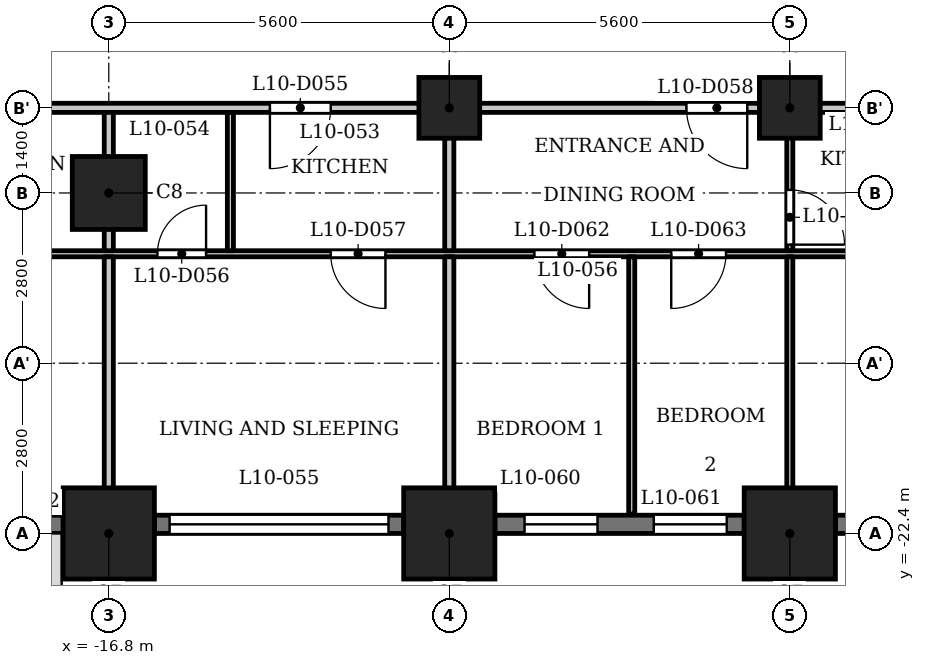
"""IFC4 building model, lengths in metres.
Left out: names, types, materials, properties, quantities, classifications, styles, units other than length and angle.
Written with IfcOpenShell. Run it as: python <this file> out.ifc"""

import sys

from ifc_helpers import new_model, si_unit, direction, frame, frame_2d, origin, origin_2d, place, context, subcontext, project, spatial, rectangle, extrude, element, fill, save


model = new_model("IFC4")
c1 = context("Model", 3, precision=1e-05, world=origin(), true_north=direction((0.0, 1.0)))
c2 = subcontext(c1, "Body", "Model", "MODEL_VIEW")
j1 = project(units=[si_unit("LENGTHUNIT", "METRE"), si_unit("PLANEANGLEUNIT", "RADIAN")], contexts=[c1])
p1 = place(None, origin())
s1 = spatial("IfcSite", under=j1, at=p1, CompositionType="ELEMENT")
p2 = place(p1, origin())
s2 = spatial("IfcBuilding", under=s1, at=p2, CompositionType="ELEMENT")
p3 = place(p2, frame((0.0, 0.0, 44.5)))
s3 = spatial("IfcBuildingStorey", under=s2, at=p3, CompositionType="ELEMENT", Elevation=44.5)
for number, where, z_axis, x_axis in (
    (1, (-16.8, -22.4, 0.0), (0.0, 0.0, 1.0), (1.0, 0.0, 0.0)),
    (2, (-11.2, -22.4, 0.0), (0.0, 0.0, 1.0), (1.0, 0.0, 0.0)),
    (3, (-5.6, -22.4, 0.0), (0.0, 0.0, 1.0), (1.0, 0.0, 0.0)),
):
    element("IfcColumn", number, at=place(p3, frame(where, z_axis=z_axis, x_axis=x_axis)), inside=s3, PredefinedType="COLUMN", context=c2, shape_type="SweptSolid", body=[
        extrude(rectangle(XDim=1.5, YDim=1.5, at=origin_2d()), origin(), (0.0, 0.0, 1.0), 3.5),
    ])
p4 = place(p3, frame((-16.8, -16.8, 0.0), z_axis=(0.0, 0.0, 1.0), x_axis=(1.0, 0.0, 0.0)))
e4 = element("IfcColumn", 4, at=p4, inside=s3, PredefinedType="COLUMN", context=c2, shape_type="SweptSolid", body=[
    extrude(rectangle(XDim=1.2, YDim=1.2, at=origin_2d()), origin(), (0.0, 0.0, 1.0), 3.5),
])
for number, where, z_axis, x_axis in (
    (5, (-11.2, -15.4, 0.0), (0.0, 0.0, 1.0), (1.0, 0.0, 0.0)),
    (6, (-5.6, -15.4, 0.0), (0.0, 0.0, 1.0), (1.0, 0.0, 0.0)),
):
    element("IfcColumn", number, at=place(p3, frame(where, z_axis=z_axis, x_axis=x_axis)), inside=s3, PredefinedType="COLUMN", context=c2, shape_type="SweptSolid", body=[
        extrude(rectangle(XDim=1.0, YDim=1.0, at=origin_2d()), origin(), (0.0, 0.0, 1.0), 3.5),
    ])
p5 = place(p3, frame((-20.0, -22.25, 0.0), z_axis=(0.0, 0.0, 1.0), x_axis=(1.0, 0.0, 0.0)))
e7 = element("IfcWall", 7, at=p5, inside=s3, PredefinedType="SOLIDWALL", context=c2, shape_type="SweptSolid", body=[
    extrude(rectangle(XDim=2.45, YDim=0.3, at=frame_2d((1.225, 0.0))), origin(), (0.0, 0.0, 1.0), 2.35),
])
p6 = place(p5, frame((0.325, 0.0, 0.9)))
e8 = element("IfcOpeningElement", 8, at=p6, cuts=e7, PredefinedType="OPENING", context=c2, shape_type="SweptSolid", body=[
    extrude(rectangle(XDim=1.8, YDim=1.25, at=frame_2d((0.9, 0.625))), frame((0.0, 0.16, 0.0), z_axis=(0.0, -1.0, 0.0), x_axis=(1.0, 0.0, 0.0)), (0.0, 0.0, 1.0), 0.32),
])
p7 = place(p3, frame((-16.05, -22.25, 0.0), z_axis=(0.0, 0.0, 1.0), x_axis=(1.0, 0.0, 0.0)))
e9 = element("IfcWall", 9, at=p7, inside=s3, PredefinedType="SOLIDWALL", context=c2, shape_type="SweptSolid", body=[
    extrude(rectangle(XDim=4.1, YDim=0.3, at=frame_2d((2.05, 0.0))), origin(), (0.0, 0.0, 1.0), 2.35),
])
p8 = place(p7, frame((0.25, 0.0, 1.2)))
e10 = element("IfcOpeningElement", 10, at=p8, cuts=e9, PredefinedType="OPENING", context=c2, shape_type="SweptSolid", body=[
    extrude(rectangle(XDim=3.6, YDim=0.95, at=frame_2d((1.8, 0.475))), frame((0.0, 0.16, 0.0), z_axis=(0.0, -1.0, 0.0), x_axis=(1.0, 0.0, 0.0)), (0.0, 0.0, 1.0), 0.32),
])
p9 = place(p3, frame((-10.45, -22.25, 0.0), z_axis=(0.0, 0.0, 1.0), x_axis=(1.0, 0.0, 0.0)))
e11 = element("IfcWall", 11, at=p9, inside=s3, PredefinedType="SOLIDWALL", context=c2, shape_type="SweptSolid", body=[
    extrude(rectangle(XDim=4.1, YDim=0.3, at=frame_2d((2.05, 0.0))), origin(), (0.0, 0.0, 1.0), 2.35),
])
p10 = place(p9, frame((0.488, 0.0, 0.6)))
e12 = element("IfcOpeningElement", 12, at=p10, cuts=e11, PredefinedType="OPENING", context=c2, shape_type="SweptSolid", body=[
    extrude(rectangle(XDim=1.2, YDim=1.55, at=frame_2d((0.6, 0.775))), frame((0.0, 0.16, 0.0), z_axis=(0.0, -1.0, 0.0), x_axis=(1.0, 0.0, 0.0)), (0.0, 0.0, 1.0), 0.32),
])
p11 = place(p9, frame((2.613, 0.0, 0.6)))
e13 = element("IfcOpeningElement", 13, at=p11, cuts=e11, PredefinedType="OPENING", context=c2, shape_type="SweptSolid", body=[
    extrude(rectangle(XDim=1.2, YDim=1.55, at=frame_2d((0.6, 0.775))), frame((0.0, 0.16, 0.0), z_axis=(0.0, -1.0, 0.0), x_axis=(1.0, 0.0, 0.0)), (0.0, 0.0, 1.0), 0.32),
])
p12 = place(p3, frame((-4.85, -22.25, 0.0), z_axis=(0.0, 0.0, 1.0), x_axis=(1.0, 0.0, 0.0)))
e14 = element("IfcWall", 14, at=p12, inside=s3, PredefinedType="SOLIDWALL", context=c2, shape_type="SweptSolid", body=[
    extrude(rectangle(XDim=4.1, YDim=0.3, at=frame_2d((2.05, 0.0))), origin(), (0.0, 0.0, 1.0), 2.35),
])
p13 = place(p12, frame((0.25, 0.0, 1.2)))
e15 = element("IfcOpeningElement", 15, at=p13, cuts=e14, PredefinedType="OPENING", context=c2, shape_type="SweptSolid", body=[
    extrude(rectangle(XDim=3.6, YDim=0.95, at=frame_2d((1.8, 0.475))), frame((0.0, 0.16, 0.0), z_axis=(0.0, -1.0, 0.0), x_axis=(1.0, 0.0, 0.0)), (0.0, 0.0, 1.0), 0.32),
])
p14 = place(p3, frame((-26.394, -17.8, 0.0), z_axis=(0.0, 0.0, 1.0), x_axis=(1.0, 0.0, 0.0)))
e16 = element("IfcWall", 16, at=p14, inside=s3, PredefinedType="PARTITIONING", context=c2, shape_type="SweptSolid", body=[
    extrude(rectangle(XDim=53.126, YDim=0.1, at=frame_2d((26.563, 0.0))), origin(), (0.0, 0.0, 1.0), 3.2),
])
p15 = place(p14, frame((0.794, 0.0, 0.0)))
e17 = element("IfcOpeningElement", 17, at=p15, cuts=e16, PredefinedType="OPENING", context=c2, shape_type="SweptSolid", body=[
    extrude(rectangle(XDim=0.8, YDim=2.1, at=frame_2d((0.4, 1.05))), frame((0.0, 0.06, 0.0), z_axis=(0.0, -1.0, 0.0), x_axis=(1.0, 0.0, 0.0)), (0.0, 0.0, 1.0), 0.12),
])
p16 = place(p14, frame((5.644, 0.0, 0.0)))
e18 = element("IfcOpeningElement", 18, at=p16, cuts=e16, PredefinedType="OPENING", context=c2, shape_type="SweptSolid", body=[
    extrude(rectangle(XDim=0.9, YDim=2.1, at=frame_2d((0.45, 1.05))), frame((0.0, 0.06, 0.0), z_axis=(0.0, -1.0, 0.0), x_axis=(1.0, 0.0, 0.0)), (0.0, 0.0, 1.0), 0.12),
])
p17 = place(p14, frame((10.394, 0.0, 0.0)))
e19 = element("IfcOpeningElement", 19, at=p17, cuts=e16, PredefinedType="OPENING", context=c2, shape_type="SweptSolid", body=[
    extrude(rectangle(XDim=0.8, YDim=2.1, at=frame_2d((0.4, 1.05))), frame((0.0, 0.06, 0.0), z_axis=(0.0, -1.0, 0.0), x_axis=(1.0, 0.0, 0.0)), (0.0, 0.0, 1.0), 0.12),
])
p18 = place(p14, frame((13.244, 0.0, 0.0)))
e20 = element("IfcOpeningElement", 20, at=p18, cuts=e16, PredefinedType="OPENING", context=c2, shape_type="SweptSolid", body=[
    extrude(rectangle(XDim=0.9, YDim=2.1, at=frame_2d((0.45, 1.05))), frame((0.0, 0.06, 0.0), z_axis=(0.0, -1.0, 0.0), x_axis=(1.0, 0.0, 0.0)), (0.0, 0.0, 1.0), 0.12),
])
p19 = place(p14, frame((23.944, 0.0, 0.0)))
e21 = element("IfcOpeningElement", 21, at=p19, cuts=e16, PredefinedType="OPENING", context=c2, shape_type="SweptSolid", body=[
    extrude(rectangle(XDim=0.8, YDim=2.1, at=frame_2d((0.4, 1.05))), frame((0.0, 0.06, 0.0), z_axis=(0.0, -1.0, 0.0), x_axis=(1.0, 0.0, 0.0)), (0.0, 0.0, 1.0), 0.12),
])
p20 = place(p14, frame((22.194, 0.0, 0.0)))
e22 = element("IfcOpeningElement", 22, at=p20, cuts=e16, PredefinedType="OPENING", context=c2, shape_type="SweptSolid", body=[
    extrude(rectangle(XDim=0.9, YDim=2.1, at=frame_2d((0.45, 1.05))), frame((0.0, 0.06, 0.0), z_axis=(0.0, -1.0, 0.0), x_axis=(1.0, 0.0, 0.0)), (0.0, 0.0, 1.0), 0.12),
])
p21 = place(p14, frame((16.594, 0.0, 0.0)))
e23 = element("IfcOpeningElement", 23, at=p21, cuts=e16, PredefinedType="OPENING", context=c2, shape_type="SweptSolid", body=[
    extrude(rectangle(XDim=0.9, YDim=2.1, at=frame_2d((0.45, 1.05))), frame((0.0, 0.06, 0.0), z_axis=(0.0, -1.0, 0.0), x_axis=(1.0, 0.0, 0.0)), (0.0, 0.0, 1.0), 0.12),
])
p22 = place(p14, frame((18.844, 0.0, 0.0)))
e24 = element("IfcOpeningElement", 24, at=p22, cuts=e16, PredefinedType="OPENING", context=c2, shape_type="SweptSolid", body=[
    extrude(rectangle(XDim=0.9, YDim=2.1, at=frame_2d((0.45, 1.05))), frame((0.0, 0.06, 0.0), z_axis=(0.0, -1.0, 0.0), x_axis=(1.0, 0.0, 0.0)), (0.0, 0.0, 1.0), 0.12),
])
p23 = place(p14, frame((30.544, 0.0, 0.0)))
e25 = element("IfcOpeningElement", 25, at=p23, cuts=e16, PredefinedType="OPENING", context=c2, shape_type="SweptSolid", body=[
    extrude(rectangle(XDim=0.8, YDim=2.1, at=frame_2d((0.4, 1.05))), frame((0.0, 0.06, 0.0), z_axis=(0.0, -1.0, 0.0), x_axis=(1.0, 0.0, 0.0)), (0.0, 0.0, 1.0), 0.12),
])
p24 = place(p14, frame((27.294, 0.0, 0.0)))
e26 = element("IfcOpeningElement", 26, at=p24, cuts=e16, PredefinedType="OPENING", context=c2, shape_type="SweptSolid", body=[
    extrude(rectangle(XDim=0.9, YDim=2.1, at=frame_2d((0.45, 1.05))), frame((0.0, 0.06, 0.0), z_axis=(0.0, -1.0, 0.0), x_axis=(1.0, 0.0, 0.0)), (0.0, 0.0, 1.0), 0.12),
])
p25 = place(p14, frame((35.894, 0.0, 0.0)))
e27 = element("IfcOpeningElement", 27, at=p25, cuts=e16, PredefinedType="OPENING", context=c2, shape_type="SweptSolid", body=[
    extrude(rectangle(XDim=0.8, YDim=2.1, at=frame_2d((0.4, 1.05))), frame((0.0, 0.06, 0.0), z_axis=(0.0, -1.0, 0.0), x_axis=(1.0, 0.0, 0.0)), (0.0, 0.0, 1.0), 0.12),
])
p26 = place(p14, frame((33.644, 0.0, 0.0)))
e28 = element("IfcOpeningElement", 28, at=p26, cuts=e16, PredefinedType="OPENING", context=c2, shape_type="SweptSolid", body=[
    extrude(rectangle(XDim=0.9, YDim=2.1, at=frame_2d((0.45, 1.05))), frame((0.0, 0.06, 0.0), z_axis=(0.0, -1.0, 0.0), x_axis=(1.0, 0.0, 0.0)), (0.0, 0.0, 1.0), 0.12),
])
p27 = place(p14, frame((41.494, 0.0, 0.0)))
e29 = element("IfcOpeningElement", 29, at=p27, cuts=e16, PredefinedType="OPENING", context=c2, shape_type="SweptSolid", body=[
    extrude(rectangle(XDim=0.8, YDim=2.1, at=frame_2d((0.4, 1.05))), frame((0.0, 0.06, 0.0), z_axis=(0.0, -1.0, 0.0), x_axis=(1.0, 0.0, 0.0)), (0.0, 0.0, 1.0), 0.12),
])
p28 = place(p14, frame((38.744, 0.0, 0.0)))
e30 = element("IfcOpeningElement", 30, at=p28, cuts=e16, PredefinedType="OPENING", context=c2, shape_type="SweptSolid", body=[
    extrude(rectangle(XDim=0.9, YDim=2.1, at=frame_2d((0.45, 1.05))), frame((0.0, 0.06, 0.0), z_axis=(0.0, -1.0, 0.0), x_axis=(1.0, 0.0, 0.0)), (0.0, 0.0, 1.0), 0.12),
])
p29 = place(p14, frame((49.362, 0.0, 0.0)))
e31 = element("IfcOpeningElement", 31, at=p29, cuts=e16, PredefinedType="OPENING", context=c2, shape_type="SweptSolid", body=[
    extrude(rectangle(XDim=0.8, YDim=2.1, at=frame_2d((0.4, 1.05))), frame((0.0, 0.06, 0.0), z_axis=(0.0, -1.0, 0.0), x_axis=(1.0, 0.0, 0.0)), (0.0, 0.0, 1.0), 0.12),
])
p30 = place(p14, frame((45.094, 0.0, 0.0)))
e32 = element("IfcOpeningElement", 32, at=p30, cuts=e16, PredefinedType="OPENING", context=c2, shape_type="SweptSolid", body=[
    extrude(rectangle(XDim=0.9, YDim=2.1, at=frame_2d((0.45, 1.05))), frame((0.0, 0.06, 0.0), z_axis=(0.0, -1.0, 0.0), x_axis=(1.0, 0.0, 0.0)), (0.0, 0.0, 1.0), 0.12),
])
p31 = place(p3, frame((-27.484, -15.4, 0.0), z_axis=(0.0, 0.0, 1.0), x_axis=(1.0, 0.0, 0.0)))
e33 = element("IfcWall", 33, at=p31, inside=s3, PredefinedType="PARTITIONING", context=c2, shape_type="SweptSolid", body=[
    extrude(rectangle(XDim=54.968, YDim=0.15, at=frame_2d((27.484, 0.0))), origin(), (0.0, 0.0, 1.0), 3.2),
])
p32 = place(p31, frame((5.734, 0.0, 0.0)))
e34 = element("IfcOpeningElement", 34, at=p32, cuts=e33, PredefinedType="OPENING", context=c2, shape_type="SweptSolid", body=[
    extrude(rectangle(XDim=1.0, YDim=2.1, at=frame_2d((0.5, 1.05))), frame((0.0, 0.085, 0.0), z_axis=(0.0, -1.0, 0.0), x_axis=(1.0, 0.0, 0.0)), (0.0, 0.0, 1.0), 0.17),
])
p33 = place(p31, frame((13.334, 0.0, 0.0)))
e35 = element("IfcOpeningElement", 35, at=p33, cuts=e33, PredefinedType="OPENING", context=c2, shape_type="SweptSolid", body=[
    extrude(rectangle(XDim=1.0, YDim=2.1, at=frame_2d((0.5, 1.05))), frame((0.0, 0.085, 0.0), z_axis=(0.0, -1.0, 0.0), x_axis=(1.0, 0.0, 0.0)), (0.0, 0.0, 1.0), 0.17),
])
p34 = place(p31, frame((20.184, 0.0, 0.0)))
e36 = element("IfcOpeningElement", 36, at=p34, cuts=e33, PredefinedType="OPENING", context=c2, shape_type="SweptSolid", body=[
    extrude(rectangle(XDim=1.0, YDim=2.1, at=frame_2d((0.5, 1.05))), frame((0.0, 0.085, 0.0), z_axis=(0.0, -1.0, 0.0), x_axis=(1.0, 0.0, 0.0)), (0.0, 0.0, 1.0), 0.17),
])
p35 = place(p31, frame((29.384, 0.0, 0.0)))
e37 = element("IfcOpeningElement", 37, at=p35, cuts=e33, PredefinedType="OPENING", context=c2, shape_type="SweptSolid", body=[
    extrude(rectangle(XDim=1.0, YDim=2.1, at=frame_2d((0.5, 1.05))), frame((0.0, 0.085, 0.0), z_axis=(0.0, -1.0, 0.0), x_axis=(1.0, 0.0, 0.0)), (0.0, 0.0, 1.0), 0.17),
])
p36 = place(p31, frame((33.734, 0.0, 0.0)))
e38 = element("IfcOpeningElement", 38, at=p36, cuts=e33, PredefinedType="OPENING", context=c2, shape_type="SweptSolid", body=[
    extrude(rectangle(XDim=1.0, YDim=2.1, at=frame_2d((0.5, 1.05))), frame((0.0, 0.085, 0.0), z_axis=(0.0, -1.0, 0.0), x_axis=(1.0, 0.0, 0.0)), (0.0, 0.0, 1.0), 0.17),
])
p37 = place(p31, frame((39.584, 0.0, 0.0)))
e39 = element("IfcOpeningElement", 39, at=p37, cuts=e33, PredefinedType="OPENING", context=c2, shape_type="SweptSolid", body=[
    extrude(rectangle(XDim=1.0, YDim=2.1, at=frame_2d((0.5, 1.05))), frame((0.0, 0.085, 0.0), z_axis=(0.0, -1.0, 0.0), x_axis=(1.0, 0.0, 0.0)), (0.0, 0.0, 1.0), 0.17),
])
p38 = place(p31, frame((45.184, 0.0, 0.0)))
e40 = element("IfcOpeningElement", 40, at=p38, cuts=e33, PredefinedType="OPENING", context=c2, shape_type="SweptSolid", body=[
    extrude(rectangle(XDim=1.0, YDim=2.1, at=frame_2d((0.5, 1.05))), frame((0.0, 0.085, 0.0), z_axis=(0.0, -1.0, 0.0), x_axis=(1.0, 0.0, 0.0)), (0.0, 0.0, 1.0), 0.17),
])
p39 = place(p3, frame((-16.8, -23.13, 0.0), z_axis=(0.0, 0.0, 1.0), x_axis=(0.0, 1.0, 0.0)))
e41 = element("IfcWall", 41, at=p39, inside=s3, PredefinedType="PARTITIONING", context=c2, shape_type="SweptSolid", body=[
    extrude(rectangle(XDim=5.28, YDim=0.15, at=frame_2d((2.64, 0.0))), origin(), (0.0, 0.0, 1.0), 3.2),
])
p40 = place(p3, frame((-16.8, -17.75, 0.0), z_axis=(0.0, 0.0, 1.0), x_axis=(0.0, 1.0, 0.0)))
e42 = element("IfcWall", 42, at=p40, inside=s3, PredefinedType="PARTITIONING", context=c2, shape_type="SweptSolid", body=[
    extrude(rectangle(XDim=2.275, YDim=0.15, at=frame_2d((1.137, 0.0))), origin(), (0.0, 0.0, 1.0), 3.2),
])
p41 = place(p3, frame((-14.8, -17.75, 0.0), z_axis=(0.0, 0.0, 1.0), x_axis=(0.0, 1.0, 0.0)))
e43 = element("IfcWall", 43, at=p41, inside=s3, PredefinedType="PARTITIONING", context=c2, shape_type="SweptSolid", body=[
    extrude(rectangle(XDim=2.275, YDim=0.1, at=frame_2d((1.137, 0.0))), origin(), (0.0, 0.0, 1.0), 3.2),
])
p42 = place(p3, frame((-11.2, -23.13, 0.0), z_axis=(0.0, 0.0, 1.0), x_axis=(0.0, 1.0, 0.0)))
e44 = element("IfcWall", 44, at=p42, inside=s3, PredefinedType="PARTITIONING", context=c2, shape_type="SweptSolid", body=[
    extrude(rectangle(XDim=5.28, YDim=0.15, at=frame_2d((2.64, 0.0))), origin(), (0.0, 0.0, 1.0), 3.2),
])
p43 = place(p3, frame((-11.2, -17.75, 0.0), z_axis=(0.0, 0.0, 1.0), x_axis=(0.0, 1.0, 0.0)))
e45 = element("IfcWall", 45, at=p43, inside=s3, PredefinedType="PARTITIONING", context=c2, shape_type="SweptSolid", body=[
    extrude(rectangle(XDim=2.275, YDim=0.15, at=frame_2d((1.137, 0.0))), origin(), (0.0, 0.0, 1.0), 3.2),
])
p44 = place(p3, frame((-8.2, -22.08, 0.0), z_axis=(0.0, 0.0, 1.0), x_axis=(0.0, 1.0, 0.0)))
e46 = element("IfcWall", 46, at=p44, inside=s3, PredefinedType="PARTITIONING", context=c2, shape_type="SweptSolid", body=[
    extrude(rectangle(XDim=4.23, YDim=0.1, at=frame_2d((2.115, 0.0))), origin(), (0.0, 0.0, 1.0), 3.2),
])
p45 = place(p3, frame((-5.6, -23.13, 0.0), z_axis=(0.0, 0.0, 1.0), x_axis=(0.0, 1.0, 0.0)))
e47 = element("IfcWall", 47, at=p45, inside=s3, PredefinedType="PARTITIONING", context=c2, shape_type="SweptSolid", body=[
    extrude(rectangle(XDim=5.28, YDim=0.1, at=frame_2d((2.64, 0.0))), origin(), (0.0, 0.0, 1.0), 3.2),
])
p46 = place(p3, frame((-5.6, -17.75, 0.0), z_axis=(0.0, 0.0, 1.0), x_axis=(0.0, 1.0, 0.0)))
e48 = element("IfcWall", 48, at=p46, inside=s3, PredefinedType="PARTITIONING", context=c2, shape_type="SweptSolid", body=[
    extrude(rectangle(XDim=2.275, YDim=0.1, at=frame_2d((1.137, 0.0))), origin(), (0.0, 0.0, 1.0), 3.2),
])
p47 = place(p46, frame((0.1, 0.0, 0.0)))
e49 = element("IfcOpeningElement", 49, at=p47, cuts=e48, PredefinedType="OPENING", context=c2, shape_type="SweptSolid", body=[
    extrude(rectangle(XDim=0.9, YDim=2.1, at=frame_2d((0.45, 1.05))), frame((0.0, 0.06, 0.0), z_axis=(0.0, -1.0, 0.0), x_axis=(1.0, 0.0, 0.0)), (0.0, 0.0, 1.0), 0.12),
])
p48 = place(p33, origin())
e50 = element("IfcDoor", 50, at=p48, inside=s3, OperationType="SINGLE_SWING_LEFT", PredefinedType="DOOR", context=c2, shape_type="SweptSolid", body=[
    extrude(rectangle(XDim=1.0, YDim=2.1, at=frame_2d((0.5, 1.05))), frame((0.0, 0.025, 0.0), z_axis=(0.0, -1.0, 0.0), x_axis=(1.0, 0.0, 0.0)), (0.0, 0.0, 1.0), 0.05),
])
fill(e35, e50)
p49 = place(p17, origin())
e51 = element("IfcDoor", 51, at=p49, inside=s3, OperationType="SINGLE_SWING_LEFT", PredefinedType="DOOR", context=c2, shape_type="SweptSolid", body=[
    extrude(rectangle(XDim=0.8, YDim=2.1, at=frame_2d((0.4, 1.05))), frame((0.0, 0.025, 0.0), z_axis=(0.0, -1.0, 0.0), x_axis=(1.0, 0.0, 0.0)), (0.0, 0.0, 1.0), 0.05),
])
fill(e19, e51)
p50 = place(p18, origin())
e52 = element("IfcDoor", 52, at=p50, inside=s3, OperationType="SINGLE_SWING_RIGHT", PredefinedType="DOOR", context=c2, shape_type="SweptSolid", body=[
    extrude(rectangle(XDim=0.9, YDim=2.1, at=frame_2d((0.45, 1.05))), frame((0.0, 0.025, 0.0), z_axis=(0.0, -1.0, 0.0), x_axis=(1.0, 0.0, 0.0)), (0.0, 0.0, 1.0), 0.05),
])
fill(e20, e52)
p51 = place(p34, origin())
e53 = element("IfcDoor", 53, at=p51, inside=s3, OperationType="SINGLE_SWING_RIGHT", PredefinedType="DOOR", context=c2, shape_type="SweptSolid", body=[
    extrude(rectangle(XDim=1.0, YDim=2.1, at=frame_2d((0.5, 1.05))), frame((0.0, 0.025, 0.0), z_axis=(0.0, -1.0, 0.0), x_axis=(1.0, 0.0, 0.0)), (0.0, 0.0, 1.0), 0.05),
])
fill(e36, e53)
p52 = place(p47, origin())
e54 = element("IfcDoor", 54, at=p52, inside=s3, OperationType="SINGLE_SWING_LEFT", PredefinedType="DOOR", context=c2, shape_type="SweptSolid", body=[
    extrude(rectangle(XDim=0.9, YDim=2.1, at=frame_2d((0.45, 1.05))), frame((0.0, 0.025, 0.0), z_axis=(0.0, -1.0, 0.0), x_axis=(1.0, 0.0, 0.0)), (0.0, 0.0, 1.0), 0.05),
])
fill(e49, e54)
p53 = place(p21, origin())
e55 = element("IfcDoor", 55, at=p53, inside=s3, OperationType="SINGLE_SWING_RIGHT", PredefinedType="DOOR", context=c2, shape_type="SweptSolid", body=[
    extrude(rectangle(XDim=0.9, YDim=2.1, at=frame_2d((0.45, 1.05))), frame((0.0, 0.025, 0.0), z_axis=(0.0, -1.0, 0.0), x_axis=(1.0, 0.0, 0.0)), (0.0, 0.0, 1.0), 0.05),
])
fill(e23, e55)
p54 = place(p22, origin())
e56 = element("IfcDoor", 56, at=p54, inside=s3, OperationType="SINGLE_SWING_LEFT", PredefinedType="DOOR", context=c2, shape_type="SweptSolid", body=[
    extrude(rectangle(XDim=0.9, YDim=2.1, at=frame_2d((0.45, 1.05))), frame((0.0, 0.025, 0.0), z_axis=(0.0, -1.0, 0.0), x_axis=(1.0, 0.0, 0.0)), (0.0, 0.0, 1.0), 0.05),
])
fill(e24, e56)
p55 = place(p8, origin())
e57 = element("IfcWindow", 57, at=p55, inside=s3, PartitioningType="SINGLE_PANEL", PredefinedType="WINDOW", context=c2, shape_type="SweptSolid", body=[
    extrude(rectangle(XDim=3.6, YDim=0.95, at=frame_2d((1.8, 0.475))), frame((0.0, 0.03, 0.0), z_axis=(0.0, -1.0, 0.0), x_axis=(1.0, 0.0, 0.0)), (0.0, 0.0, 1.0), 0.06),
])
fill(e10, e57)
p56 = place(p10, origin())
e58 = element("IfcWindow", 58, at=p56, inside=s3, PartitioningType="SINGLE_PANEL", PredefinedType="WINDOW", context=c2, shape_type="SweptSolid", body=[
    extrude(rectangle(XDim=1.2, YDim=1.55, at=frame_2d((0.6, 0.775))), frame((0.0, 0.03, 0.0), z_axis=(0.0, -1.0, 0.0), x_axis=(1.0, 0.0, 0.0)), (0.0, 0.0, 1.0), 0.06),
])
fill(e12, e58)
p57 = place(p11, origin())
e59 = element("IfcWindow", 59, at=p57, inside=s3, PartitioningType="SINGLE_PANEL", PredefinedType="WINDOW", context=c2, shape_type="SweptSolid", body=[
    extrude(rectangle(XDim=1.2, YDim=1.55, at=frame_2d((0.6, 0.775))), frame((0.0, 0.03, 0.0), z_axis=(0.0, -1.0, 0.0), x_axis=(1.0, 0.0, 0.0)), (0.0, 0.0, 1.0), 0.06),
])
fill(e13, e59)
save(model, sys.argv[1])
